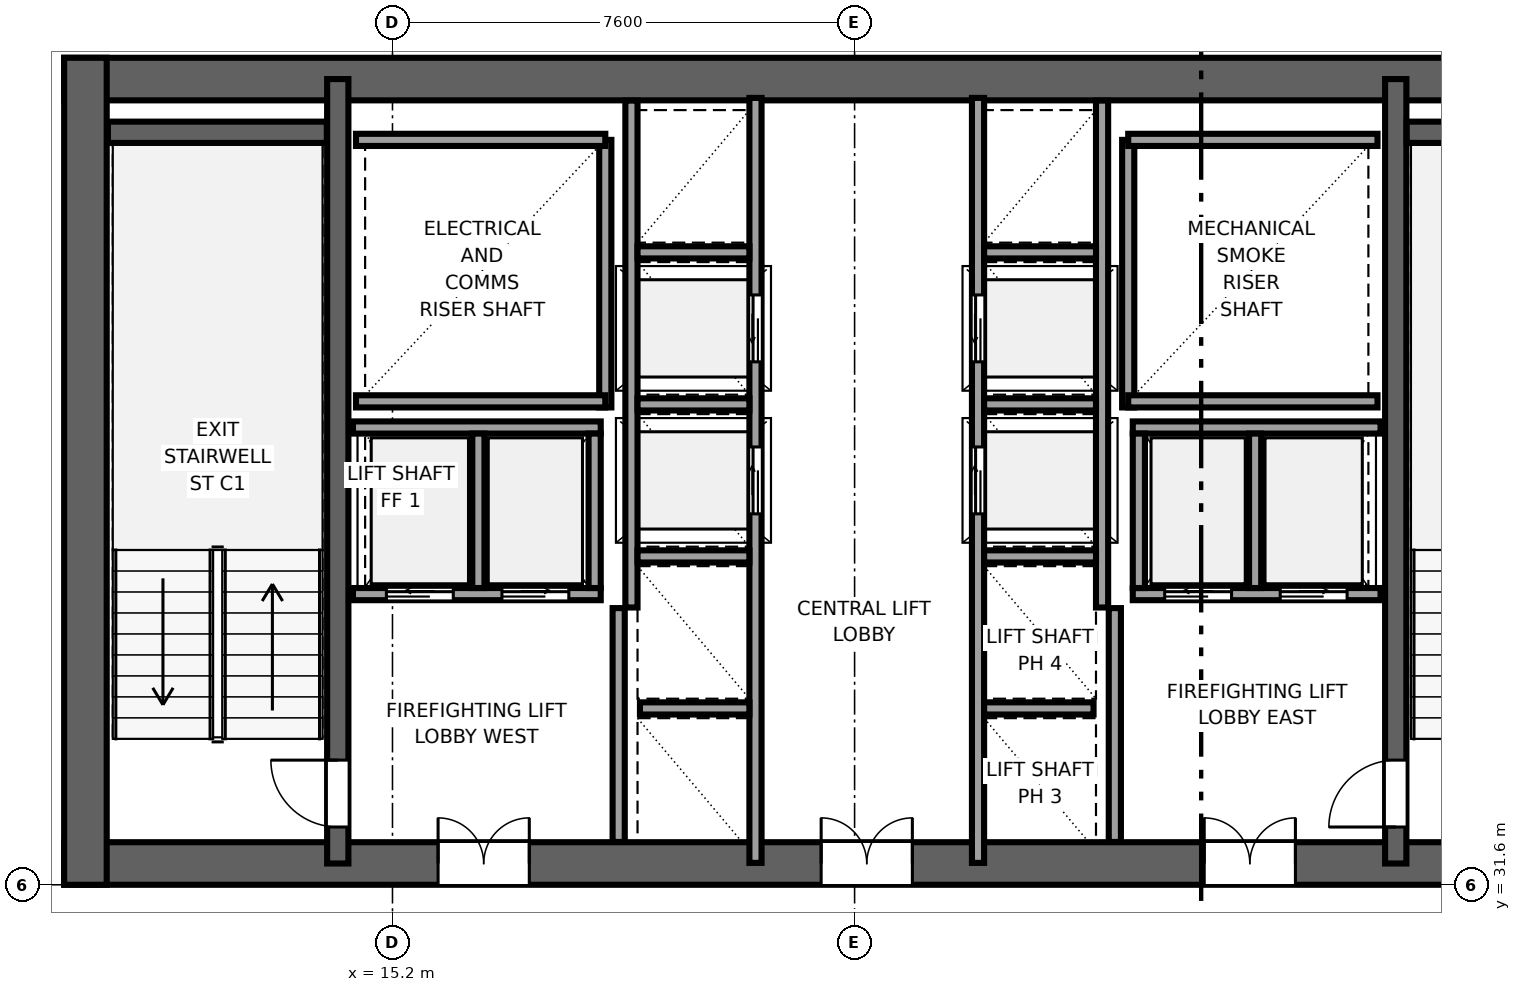
"""IFC4 building model, lengths in metres.
Left out: names, types, materials, properties, quantities, classifications, styles, units other than length and angle.
Written with IfcOpenShell. Run it as: python <this file> out.ifc"""

import sys

from ifc_helpers import new_model, si_unit, direction, frame, frame_2d, origin, place, context, subcontext, project, spatial, rectangle, extrude, source, transform, mapped, element, fill, save


model = new_model("IFC4")
c1 = context("Model", 3, precision=1e-05, world=origin(), true_north=direction((0.0, 1.0)))
c2 = subcontext(c1, "Body", "Model", "MODEL_VIEW")
j1 = project(units=[si_unit("LENGTHUNIT", "METRE"), si_unit("PLANEANGLEUNIT", "RADIAN")], contexts=[c1])
p1 = place(None, origin())
s1 = spatial("IfcSite", under=j1, at=p1, CompositionType="ELEMENT")
p2 = place(p1, origin())
s2 = spatial("IfcBuilding", under=s1, at=p2, CompositionType="ELEMENT")
p3 = place(p2, frame((0.0, 0.0, 161.25)))
s3 = spatial("IfcBuildingStorey", under=s2, at=p3, CompositionType="ELEMENT", Elevation=161.25)
p4 = place(p3, frame((9.8, 31.95, 0.0), z_axis=(0.0, 0.0, 1.0), x_axis=(1.0, 0.0, 0.0)))
e1 = element("IfcWall", 1, at=p4, inside=s3, PredefinedType="SHEAR", context=c2, shape_type="SweptSolid", body=[
    extrude(rectangle(XDim=26.4, YDim=0.7, at=frame_2d((13.2, 0.0))), origin(), (0.0, 0.0, 1.0), 3.55),
])
p5 = place(p4, frame((7.65, 0.0, 0.0), z_axis=(0.0, 0.0, 1.0), x_axis=(-1.0, 0.0, 0.0)))
e2 = element("IfcOpeningElement", 2, at=p5, cuts=e1, PredefinedType="OPENING", context=c2, shape_type="SweptSolid", body=[
    extrude(rectangle(XDim=1.5, YDim=2.04, at=frame_2d((0.75, 1.02))), frame((0.0, 0.36, 0.0), z_axis=(0.0, -1.0, 0.0), x_axis=(1.0, 0.0, 0.0)), (0.0, 0.0, 1.0), 0.72),
])
p6 = place(p4, frame((13.95, 0.0, 0.0), z_axis=(0.0, 0.0, 1.0), x_axis=(-1.0, 0.0, 0.0)))
e3 = element("IfcOpeningElement", 3, at=p6, cuts=e1, PredefinedType="OPENING", context=c2, shape_type="SweptSolid", body=[
    extrude(rectangle(XDim=1.5, YDim=2.04, at=frame_2d((0.75, 1.02))), frame((0.0, 0.36, 0.0), z_axis=(0.0, -1.0, 0.0), x_axis=(1.0, 0.0, 0.0)), (0.0, 0.0, 1.0), 0.72),
])
p7 = place(p4, frame((20.25, 0.0, 0.0), z_axis=(0.0, 0.0, 1.0), x_axis=(-1.0, 0.0, 0.0)))
e4 = element("IfcOpeningElement", 4, at=p7, cuts=e1, PredefinedType="OPENING", context=c2, shape_type="SweptSolid", body=[
    extrude(rectangle(XDim=1.5, YDim=2.04, at=frame_2d((0.75, 1.02))), frame((0.0, 0.36, 0.0), z_axis=(0.0, -1.0, 0.0), x_axis=(1.0, 0.0, 0.0)), (0.0, 0.0, 1.0), 0.72),
])
p8 = place(p3, frame((9.8, 44.85, 0.0), z_axis=(0.0, 0.0, 1.0), x_axis=(1.0, 0.0, 0.0)))
e5 = element("IfcWall", 5, at=p8, inside=s3, PredefinedType="SHEAR", context=c2, shape_type="SweptSolid", body=[
    extrude(rectangle(XDim=26.4, YDim=0.7, at=frame_2d((13.2, 0.0))), origin(), (0.0, 0.0, 1.0), 3.55),
])
p9 = place(p3, frame((10.15, 31.6, 0.0), z_axis=(0.0, 0.0, 1.0), x_axis=(0.0, 1.0, 0.0)))
e6 = element("IfcWall", 6, at=p9, inside=s3, PredefinedType="SHEAR", context=c2, shape_type="SweptSolid", body=[
    extrude(rectangle(XDim=13.6, YDim=0.7, at=frame_2d((6.8, 0.0))), origin(), (0.0, 0.0, 1.0), 3.55),
])
p10 = place(p3, frame((14.3, 31.95, 0.0), z_axis=(0.0, 0.0, 1.0), x_axis=(0.0, 1.0, 0.0)))
e7 = element("IfcWall", 7, at=p10, inside=s3, PredefinedType="SHEAR", context=c2, shape_type="SweptSolid", body=[
    extrude(rectangle(XDim=12.9, YDim=0.35, at=frame_2d((6.45, 0.0))), origin(), (0.0, 0.0, 1.0), 3.55),
])
p11 = place(p10, frame((0.6, 0.0, 0.0)))
e8 = element("IfcOpeningElement", 8, at=p11, cuts=e7, PredefinedType="OPENING", context=c2, shape_type="SweptSolid", body=[
    extrude(rectangle(XDim=1.1, YDim=2.12, at=frame_2d((0.55, 1.06))), frame((0.0, 0.185, 0.0), z_axis=(0.0, -1.0, 0.0), x_axis=(1.0, 0.0, 0.0)), (0.0, 0.0, 1.0), 0.37),
])
p12 = place(p3, frame((31.7, 31.95, 0.0), z_axis=(0.0, 0.0, 1.0), x_axis=(0.0, 1.0, 0.0)))
e9 = element("IfcWall", 9, at=p12, inside=s3, PredefinedType="SHEAR", context=c2, shape_type="SweptSolid", body=[
    extrude(rectangle(XDim=12.9, YDim=0.35, at=frame_2d((6.45, 0.0))), origin(), (0.0, 0.0, 1.0), 3.55),
])
p13 = place(p12, frame((1.7, 0.0, 0.0), z_axis=(0.0, 0.0, 1.0), x_axis=(-1.0, 0.0, 0.0)))
e10 = element("IfcOpeningElement", 10, at=p13, cuts=e9, PredefinedType="OPENING", context=c2, shape_type="SweptSolid", body=[
    extrude(rectangle(XDim=1.1, YDim=2.12, at=frame_2d((0.55, 1.06))), frame((0.0, 0.185, 0.0), z_axis=(0.0, -1.0, 0.0), x_axis=(1.0, 0.0, 0.0)), (0.0, 0.0, 1.0), 0.37),
])
for number, where, z_axis, x_axis in (
    (11, (10.52, 43.975, 0.0), (0.0, 0.0, 1.0), (1.0, 0.0, 0.0)),
    (12, (31.88, 43.975, 0.0), (0.0, 0.0, 1.0), (1.0, 0.0, 0.0)),
):
    element("IfcWall", number, at=place(p3, frame(where, z_axis=z_axis, x_axis=x_axis)), inside=s3, PredefinedType="SHEAR", context=c2, shape_type="SweptSolid", body=[
        extrude(rectangle(XDim=3.6, YDim=0.35, at=frame_2d((1.8, 0.0))), origin(), (0.0, 0.0, 1.0), 3.55),
    ])
p14 = place(p3, frame((18.7, 39.45, 0.0), z_axis=(0.0, 0.0, 1.0), x_axis=(0.0, 1.0, 0.0)))
e13 = element("IfcWall", 13, at=p14, inside=s3, PredefinedType="SOLIDWALL", context=c2, shape_type="SweptSolid", body=[
    extrude(rectangle(XDim=4.4, YDim=0.2, at=frame_2d((2.2, 0.0))), origin(), (0.0, 0.0, 1.0), 3.37),
])
for number, where, z_axis, x_axis in (
    (14, (14.6, 39.55, 0.0), (0.0, 0.0, 1.0), (1.0, 0.0, 0.0)),
    (15, (14.6, 43.85, 0.0), (0.0, 0.0, 1.0), (1.0, 0.0, 0.0)),
):
    element("IfcWall", number, at=place(p3, frame(where, z_axis=z_axis, x_axis=x_axis)), inside=s3, PredefinedType="SOLIDWALL", context=c2, shape_type="SweptSolid", body=[
        extrude(rectangle(XDim=4.1, YDim=0.2, at=frame_2d((2.05, 0.0))), origin(), (0.0, 0.0, 1.0), 3.37),
    ])
p15 = place(p3, frame((27.3, 39.45, 0.0), z_axis=(0.0, 0.0, 1.0), x_axis=(0.0, 1.0, 0.0)))
e16 = element("IfcWall", 16, at=p15, inside=s3, PredefinedType="SOLIDWALL", context=c2, shape_type="SweptSolid", body=[
    extrude(rectangle(XDim=4.4, YDim=0.2, at=frame_2d((2.2, 0.0))), origin(), (0.0, 0.0, 1.0), 3.37),
])
for number, where, z_axis, x_axis in (
    (17, (27.3, 39.55, 0.0), (0.0, 0.0, 1.0), (1.0, 0.0, 0.0)),
    (18, (27.3, 43.85, 0.0), (0.0, 0.0, 1.0), (1.0, 0.0, 0.0)),
):
    element("IfcWall", number, at=place(p3, frame(where, z_axis=z_axis, x_axis=x_axis)), inside=s3, PredefinedType="SOLIDWALL", context=c2, shape_type="SweptSolid", body=[
        extrude(rectangle(XDim=4.1, YDim=0.2, at=frame_2d((2.05, 0.0))), origin(), (0.0, 0.0, 1.0), 3.37),
    ])
for number, where, z_axis, x_axis in (
    (19, (18.92, 32.304, 0.0), (0.0, 0.0, 1.0), (0.0, 1.0, 0.0)),
    (20, (27.08, 32.304, 0.0), (0.0, 0.0, 1.0), (0.0, 1.0, 0.0)),
):
    element("IfcWall", number, at=place(p3, frame(where, z_axis=z_axis, x_axis=x_axis)), inside=s3, PredefinedType="SOLIDWALL", context=c2, shape_type="SweptSolid", body=[
        extrude(rectangle(XDim=3.846, YDim=0.2, at=frame_2d((1.923, 0.0))), origin(), (0.0, 0.0, 1.0), 3.37),
    ])
p16 = place(p3, frame((21.17, 31.96, 0.0), z_axis=(0.0, 0.0, 1.0), x_axis=(0.0, 1.0, 0.0)))
e21 = element("IfcWall", 21, at=p16, inside=s3, PredefinedType="SOLIDWALL", context=c2, shape_type="SweptSolid", body=[
    extrude(rectangle(XDim=12.58, YDim=0.2, at=frame_2d((6.29, 0.0))), origin(), (0.0, 0.0, 1.0), 3.37),
])
p17 = place(p16, frame((5.74, 0.0, 0.0)))
e22 = element("IfcOpeningElement", 22, at=p17, cuts=e21, PredefinedType="OPENING", context=c2, shape_type="SweptSolid", body=[
    extrude(rectangle(XDim=1.1, YDim=2.12, at=frame_2d((0.55, 1.06))), frame((0.0, 0.11, 0.0), z_axis=(0.0, -1.0, 0.0), x_axis=(1.0, 0.0, 0.0)), (0.0, 0.0, 1.0), 0.22),
])
p18 = place(p16, frame((8.24, 0.0, 0.0)))
e23 = element("IfcOpeningElement", 23, at=p18, cuts=e21, PredefinedType="OPENING", context=c2, shape_type="SweptSolid", body=[
    extrude(rectangle(XDim=1.1, YDim=2.12, at=frame_2d((0.55, 1.06))), frame((0.0, 0.11, 0.0), z_axis=(0.0, -1.0, 0.0), x_axis=(1.0, 0.0, 0.0)), (0.0, 0.0, 1.0), 0.22),
])
p19 = place(p3, frame((19.13, 36.16, 0.0), z_axis=(0.0, 0.0, 1.0), x_axis=(0.0, 1.0, 0.0)))
e24 = element("IfcWall", 24, at=p19, inside=s3, PredefinedType="SOLIDWALL", context=c2, shape_type="SweptSolid", body=[
    extrude(rectangle(XDim=8.336, YDim=0.2, at=frame_2d((4.168, 0.0))), origin(), (0.0, 0.0, 1.0), 3.37),
])
p20 = place(p3, frame((19.27, 34.5, 0.0), z_axis=(0.0, 0.0, 1.0), x_axis=(1.0, 0.0, 0.0)))
e25 = element("IfcWall", 25, at=p20, inside=s3, PredefinedType="SOLIDWALL", context=c2, shape_type="SweptSolid", body=[
    extrude(rectangle(XDim=1.8, YDim=0.2, at=frame_2d((0.9, 0.0))), origin(), (0.0, 0.0, 1.0), 3.37),
])
for number, where, z_axis, x_axis in (
    (26, (19.23, 37.0, 0.0), (0.0, 0.0, 1.0), (1.0, 0.0, 0.0)),
    (27, (19.23, 39.5, 0.0), (0.0, 0.0, 1.0), (1.0, 0.0, 0.0)),
    (28, (19.23, 42.0, 0.0), (0.0, 0.0, 1.0), (1.0, 0.0, 0.0)),
):
    element("IfcWall", number, at=place(p3, frame(where, z_axis=z_axis, x_axis=x_axis)), inside=s3, PredefinedType="SOLIDWALL", context=c2, shape_type="SweptSolid", body=[
        extrude(rectangle(XDim=1.84, YDim=0.2, at=frame_2d((0.92, 0.0))), origin(), (0.0, 0.0, 1.0), 3.37),
    ])
p21 = place(p3, frame((27.375, 36.38, 0.0), z_axis=(0.0, 0.0, 1.0), x_axis=(1.0, 0.0, 0.0)))
e29 = element("IfcWall", 29, at=p21, inside=s3, PredefinedType="SOLIDWALL", context=c2, shape_type="SweptSolid", body=[
    extrude(rectangle(XDim=4.075, YDim=0.2, at=frame_2d((2.038, 0.0))), origin(), (0.0, 0.0, 1.0), 3.37),
])
p22 = place(p21, frame((0.525, 0.0, 0.0)))
e30 = element("IfcOpeningElement", 30, at=p22, cuts=e29, PredefinedType="OPENING", context=c2, shape_type="SweptSolid", body=[
    extrude(rectangle(XDim=1.1, YDim=2.12, at=frame_2d((0.55, 1.06))), frame((0.0, 0.11, 0.0), z_axis=(0.0, -1.0, 0.0), x_axis=(1.0, 0.0, 0.0)), (0.0, 0.0, 1.0), 0.22),
])
p23 = place(p21, frame((2.425, 0.0, 0.0)))
e31 = element("IfcOpeningElement", 31, at=p23, cuts=e29, PredefinedType="OPENING", context=c2, shape_type="SweptSolid", body=[
    extrude(rectangle(XDim=1.1, YDim=2.12, at=frame_2d((0.55, 1.06))), frame((0.0, 0.11, 0.0), z_axis=(0.0, -1.0, 0.0), x_axis=(1.0, 0.0, 0.0)), (0.0, 0.0, 1.0), 0.22),
])
p24 = place(p3, frame((27.375, 39.12, 0.0), z_axis=(0.0, 0.0, 1.0), x_axis=(1.0, 0.0, 0.0)))
e32 = element("IfcWall", 32, at=p24, inside=s3, PredefinedType="SOLIDWALL", context=c2, shape_type="SweptSolid", body=[
    extrude(rectangle(XDim=4.075, YDim=0.2, at=frame_2d((2.038, 0.0))), origin(), (0.0, 0.0, 1.0), 3.37),
])
for number, where, z_axis, x_axis in (
    (33, (27.475, 36.48, 0.0), (0.0, 0.0, 1.0), (0.0, 1.0, 0.0)),
    (34, (29.387, 36.48, 0.0), (0.0, 0.0, 1.0), (0.0, 1.0, 0.0)),
):
    element("IfcWall", number, at=place(p3, frame(where, z_axis=z_axis, x_axis=x_axis)), inside=s3, PredefinedType="SOLIDWALL", context=c2, shape_type="SweptSolid", body=[
        extrude(rectangle(XDim=2.54, YDim=0.2, at=frame_2d((1.27, 0.0))), origin(), (0.0, 0.0, 1.0), 3.37),
    ])
p25 = place(p3, frame((14.55, 36.38, 0.0), z_axis=(0.0, 0.0, 1.0), x_axis=(1.0, 0.0, 0.0)))
e35 = element("IfcWall", 35, at=p25, inside=s3, PredefinedType="SOLIDWALL", context=c2, shape_type="SweptSolid", body=[
    extrude(rectangle(XDim=4.075, YDim=0.2, at=frame_2d((2.038, 0.0))), origin(), (0.0, 0.0, 1.0), 3.37),
])
p26 = place(p25, frame((0.55, 0.0, 0.0)))
e36 = element("IfcOpeningElement", 36, at=p26, cuts=e35, PredefinedType="OPENING", context=c2, shape_type="SweptSolid", body=[
    extrude(rectangle(XDim=1.1, YDim=2.12, at=frame_2d((0.55, 1.06))), frame((0.0, 0.11, 0.0), z_axis=(0.0, -1.0, 0.0), x_axis=(1.0, 0.0, 0.0)), (0.0, 0.0, 1.0), 0.22),
])
p27 = place(p25, frame((2.45, 0.0, 0.0)))
e37 = element("IfcOpeningElement", 37, at=p27, cuts=e35, PredefinedType="OPENING", context=c2, shape_type="SweptSolid", body=[
    extrude(rectangle(XDim=1.1, YDim=2.12, at=frame_2d((0.55, 1.06))), frame((0.0, 0.11, 0.0), z_axis=(0.0, -1.0, 0.0), x_axis=(1.0, 0.0, 0.0)), (0.0, 0.0, 1.0), 0.22),
])
p28 = place(p3, frame((14.55, 39.12, 0.0), z_axis=(0.0, 0.0, 1.0), x_axis=(1.0, 0.0, 0.0)))
e38 = element("IfcWall", 38, at=p28, inside=s3, PredefinedType="SOLIDWALL", context=c2, shape_type="SweptSolid", body=[
    extrude(rectangle(XDim=4.075, YDim=0.2, at=frame_2d((2.038, 0.0))), origin(), (0.0, 0.0, 1.0), 3.37),
])
for number, where, z_axis, x_axis in (
    (39, (18.525, 36.48, 0.0), (0.0, 0.0, 1.0), (0.0, 1.0, 0.0)),
    (40, (16.613, 36.48, 0.0), (0.0, 0.0, 1.0), (0.0, 1.0, 0.0)),
):
    element("IfcWall", number, at=place(p3, frame(where, z_axis=z_axis, x_axis=x_axis)), inside=s3, PredefinedType="SOLIDWALL", context=c2, shape_type="SweptSolid", body=[
        extrude(rectangle(XDim=2.54, YDim=0.2, at=frame_2d((1.27, 0.0))), origin(), (0.0, 0.0, 1.0), 3.37),
    ])
p29 = place(p3, frame((24.83, 31.96, 0.0), z_axis=(0.0, 0.0, 1.0), x_axis=(0.0, 1.0, 0.0)))
e41 = element("IfcWall", 41, at=p29, inside=s3, PredefinedType="SOLIDWALL", context=c2, shape_type="SweptSolid", body=[
    extrude(rectangle(XDim=12.58, YDim=0.2, at=frame_2d((6.29, 0.0))), origin(), (0.0, 0.0, 1.0), 3.37),
])
p30 = place(p29, frame((5.74, 0.0, 0.0)))
e42 = element("IfcOpeningElement", 42, at=p30, cuts=e41, PredefinedType="OPENING", context=c2, shape_type="SweptSolid", body=[
    extrude(rectangle(XDim=1.1, YDim=2.12, at=frame_2d((0.55, 1.06))), frame((0.0, 0.11, 0.0), z_axis=(0.0, -1.0, 0.0), x_axis=(1.0, 0.0, 0.0)), (0.0, 0.0, 1.0), 0.22),
])
p31 = place(p29, frame((8.24, 0.0, 0.0)))
e43 = element("IfcOpeningElement", 43, at=p31, cuts=e41, PredefinedType="OPENING", context=c2, shape_type="SweptSolid", body=[
    extrude(rectangle(XDim=1.1, YDim=2.12, at=frame_2d((0.55, 1.06))), frame((0.0, 0.11, 0.0), z_axis=(0.0, -1.0, 0.0), x_axis=(1.0, 0.0, 0.0)), (0.0, 0.0, 1.0), 0.22),
])
p32 = place(p3, frame((26.87, 36.16, 0.0), z_axis=(0.0, 0.0, 1.0), x_axis=(0.0, 1.0, 0.0)))
e44 = element("IfcWall", 44, at=p32, inside=s3, PredefinedType="SOLIDWALL", context=c2, shape_type="SweptSolid", body=[
    extrude(rectangle(XDim=8.336, YDim=0.2, at=frame_2d((4.168, 0.0))), origin(), (0.0, 0.0, 1.0), 3.37),
])
p33 = place(p3, frame((24.93, 34.5, 0.0), z_axis=(0.0, 0.0, 1.0), x_axis=(1.0, 0.0, 0.0)))
e45 = element("IfcWall", 45, at=p33, inside=s3, PredefinedType="SOLIDWALL", context=c2, shape_type="SweptSolid", body=[
    extrude(rectangle(XDim=1.8, YDim=0.2, at=frame_2d((0.9, 0.0))), origin(), (0.0, 0.0, 1.0), 3.37),
])
for number, where, z_axis, x_axis in (
    (46, (24.93, 37.0, 0.0), (0.0, 0.0, 1.0), (1.0, 0.0, 0.0)),
    (47, (24.93, 39.5, 0.0), (0.0, 0.0, 1.0), (1.0, 0.0, 0.0)),
    (48, (24.93, 42.0, 0.0), (0.0, 0.0, 1.0), (1.0, 0.0, 0.0)),
):
    element("IfcWall", number, at=place(p3, frame(where, z_axis=z_axis, x_axis=x_axis)), inside=s3, PredefinedType="SOLIDWALL", context=c2, shape_type="SweptSolid", body=[
        extrude(rectangle(XDim=1.84, YDim=0.2, at=frame_2d((0.92, 0.0))), origin(), (0.0, 0.0, 1.0), 3.37),
    ])
m1 = source(origin(), c2, "Body", "SweptSolid", [
    extrude(rectangle(XDim=1.1, YDim=2.12, at=frame_2d((0.55, 1.06))), frame((0.0, 0.025, 0.0), z_axis=(0.0, -1.0, 0.0), x_axis=(1.0, 0.0, 0.0)), (0.0, 0.0, 1.0), 0.05),
])
p34 = place(p11, origin())
e49 = element("IfcDoor", 49, at=p34, inside=s3, OperationType="SINGLE_SWING_RIGHT", PredefinedType="DOOR", context=c2, shape_type="MappedRepresentation", body=[
    mapped(m1, transform((0.0, 0.0, 0.0), x_axis=(1.0, 0.0, 0.0), y_axis=(0.0, 1.0, 0.0), z_axis=(0.0, 0.0, 1.0), scale=1.0)),
])
fill(e8, e49)
p35 = place(p13, origin())
e50 = element("IfcDoor", 50, at=p35, inside=s3, OperationType="SINGLE_SWING_LEFT", PredefinedType="DOOR", context=c2, shape_type="MappedRepresentation", body=[
    mapped(m1, transform((0.0, 0.0, 0.0), x_axis=(1.0, 0.0, 0.0), y_axis=(0.0, 1.0, 0.0), z_axis=(0.0, 0.0, 1.0), scale=1.0)),
])
fill(e10, e50)
m2 = source(origin(), c2, "Body", "SweptSolid", [
    extrude(rectangle(XDim=1.5, YDim=2.04, at=frame_2d((0.75, 1.02))), frame((0.0, 0.025, 0.0), z_axis=(0.0, -1.0, 0.0), x_axis=(1.0, 0.0, 0.0)), (0.0, 0.0, 1.0), 0.05),
])
p36 = place(p5, origin())
e51 = element("IfcDoor", 51, at=p36, inside=s3, OperationType="DOUBLE_DOOR_SINGLE_SWING", PredefinedType="DOOR", context=c2, shape_type="MappedRepresentation", body=[
    mapped(m2, transform((0.0, 0.0, 0.0), x_axis=(1.0, 0.0, 0.0), y_axis=(0.0, 1.0, 0.0), z_axis=(0.0, 0.0, 1.0), scale=1.0)),
])
fill(e2, e51)
p37 = place(p6, origin())
e52 = element("IfcDoor", 52, at=p37, inside=s3, OperationType="DOUBLE_DOOR_SINGLE_SWING", PredefinedType="DOOR", context=c2, shape_type="MappedRepresentation", body=[
    mapped(m2, transform((0.0, 0.0, 0.0), x_axis=(1.0, 0.0, 0.0), y_axis=(0.0, 1.0, 0.0), z_axis=(0.0, 0.0, 1.0), scale=1.0)),
])
fill(e3, e52)
p38 = place(p7, origin())
e53 = element("IfcDoor", 53, at=p38, inside=s3, OperationType="DOUBLE_DOOR_SINGLE_SWING", PredefinedType="DOOR", context=c2, shape_type="MappedRepresentation", body=[
    mapped(m2, transform((0.0, 0.0, 0.0), x_axis=(1.0, 0.0, 0.0), y_axis=(0.0, 1.0, 0.0), z_axis=(0.0, 0.0, 1.0), scale=1.0)),
])
fill(e4, e53)
m3 = source(origin(), c2, "Body", "SweptSolid", [
    extrude(rectangle(XDim=1.1, YDim=2.12, at=frame_2d((0.55, 1.06))), frame((0.0, 0.025, 0.0), z_axis=(0.0, -1.0, 0.0), x_axis=(1.0, 0.0, 0.0)), (0.0, 0.0, 1.0), 0.05),
])
p39 = place(p17, origin())
e54 = element("IfcDoor", 54, at=p39, inside=s3, OperationType="SLIDING_TO_RIGHT", PredefinedType="DOOR", context=c2, shape_type="MappedRepresentation", body=[
    mapped(m3, transform((0.0, 0.0, 0.0), x_axis=(1.0, 0.0, 0.0), y_axis=(0.0, 1.0, 0.0), z_axis=(0.0, 0.0, 1.0), scale=1.0)),
])
fill(e22, e54)
p40 = place(p18, origin())
e55 = element("IfcDoor", 55, at=p40, inside=s3, OperationType="SLIDING_TO_LEFT", PredefinedType="DOOR", context=c2, shape_type="MappedRepresentation", body=[
    mapped(m3, transform((0.0, 0.0, 0.0), x_axis=(1.0, 0.0, 0.0), y_axis=(0.0, 1.0, 0.0), z_axis=(0.0, 0.0, 1.0), scale=1.0)),
])
fill(e23, e55)
p41 = place(p22, origin())
e56 = element("IfcDoor", 56, at=p41, inside=s3, OperationType="SLIDING_TO_LEFT", PredefinedType="DOOR", context=c2, shape_type="MappedRepresentation", body=[
    mapped(m3, transform((0.0, 0.0, 0.0), x_axis=(1.0, 0.0, 0.0), y_axis=(0.0, 1.0, 0.0), z_axis=(0.0, 0.0, 1.0), scale=1.0)),
])
fill(e30, e56)
p42 = place(p23, origin())
e57 = element("IfcDoor", 57, at=p42, inside=s3, OperationType="SLIDING_TO_RIGHT", PredefinedType="DOOR", context=c2, shape_type="MappedRepresentation", body=[
    mapped(m3, transform((0.0, 0.0, 0.0), x_axis=(1.0, 0.0, 0.0), y_axis=(0.0, 1.0, 0.0), z_axis=(0.0, 0.0, 1.0), scale=1.0)),
])
fill(e31, e57)
p43 = place(p26, origin())
e58 = element("IfcDoor", 58, at=p43, inside=s3, OperationType="SLIDING_TO_LEFT", PredefinedType="DOOR", context=c2, shape_type="MappedRepresentation", body=[
    mapped(m3, transform((0.0, 0.0, 0.0), x_axis=(1.0, 0.0, 0.0), y_axis=(0.0, 1.0, 0.0), z_axis=(0.0, 0.0, 1.0), scale=1.0)),
])
fill(e36, e58)
p44 = place(p27, origin())
e59 = element("IfcDoor", 59, at=p44, inside=s3, OperationType="SLIDING_TO_RIGHT", PredefinedType="DOOR", context=c2, shape_type="MappedRepresentation", body=[
    mapped(m3, transform((0.0, 0.0, 0.0), x_axis=(1.0, 0.0, 0.0), y_axis=(0.0, 1.0, 0.0), z_axis=(0.0, 0.0, 1.0), scale=1.0)),
])
fill(e37, e59)
p45 = place(p30, origin())
e60 = element("IfcDoor", 60, at=p45, inside=s3, OperationType="SLIDING_TO_RIGHT", PredefinedType="DOOR", context=c2, shape_type="MappedRepresentation", body=[
    mapped(m3, transform((0.0, 0.0, 0.0), x_axis=(1.0, 0.0, 0.0), y_axis=(0.0, 1.0, 0.0), z_axis=(0.0, 0.0, 1.0), scale=1.0)),
])
fill(e42, e60)
p46 = place(p31, origin())
e61 = element("IfcDoor", 61, at=p46, inside=s3, OperationType="SLIDING_TO_LEFT", PredefinedType="DOOR", context=c2, shape_type="MappedRepresentation", body=[
    mapped(m3, transform((0.0, 0.0, 0.0), x_axis=(1.0, 0.0, 0.0), y_axis=(0.0, 1.0, 0.0), z_axis=(0.0, 0.0, 1.0), scale=1.0)),
])
fill(e43, e61)
save(model, sys.argv[1])
